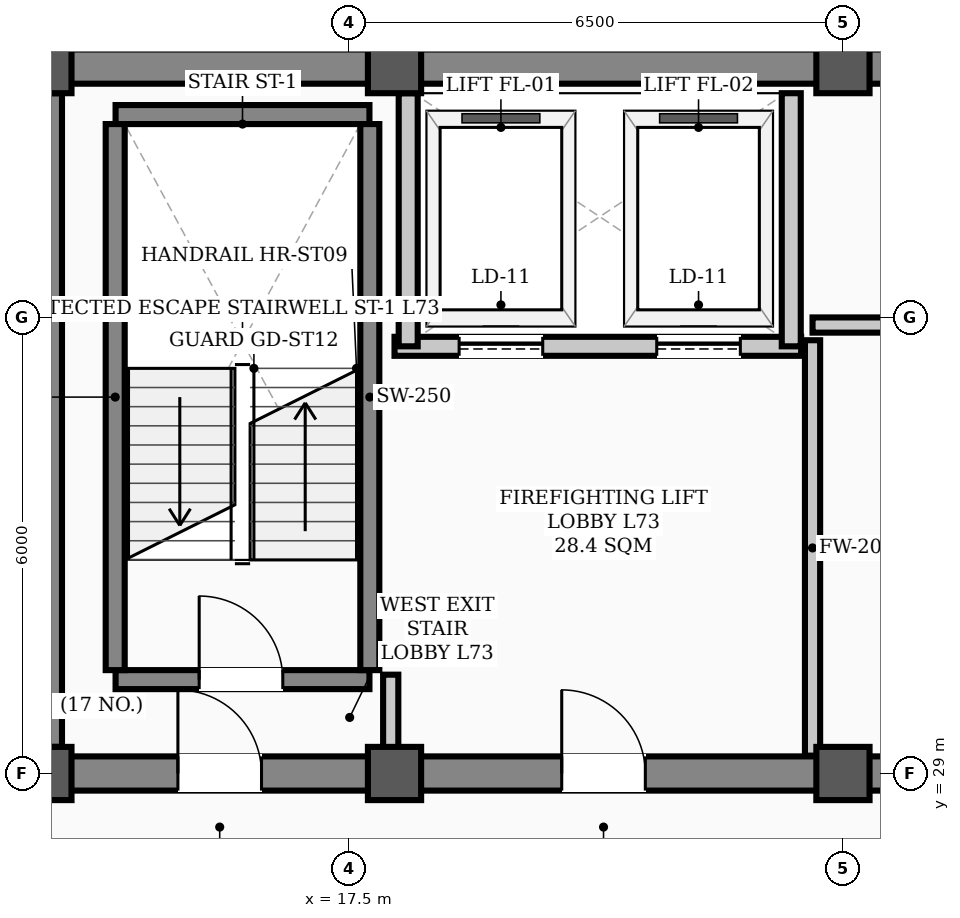
"""IFC4 building model, lengths in metres.
Left out: names, types, materials, properties, quantities, classifications, styles, units other than length and angle.
Written with IfcOpenShell. Run it as: python <this file> out.ifc"""

import sys

from ifc_helpers import new_model, si_unit, direction, frame, frame_2d, origin, origin_2d, place, context, subcontext, project, spatial, rectangle, hollow_rectangle, extrude, element, fill, save


model = new_model("IFC4")
c1 = context("Model", 3, precision=1e-05, world=origin(), true_north=direction((0.0, 1.0)))
c2 = subcontext(c1, "Body", "Model", "MODEL_VIEW")
j1 = project(units=[si_unit("LENGTHUNIT", "METRE"), si_unit("PLANEANGLEUNIT", "RADIAN")], contexts=[c1])
p1 = place(None, origin())
s1 = spatial("IfcSite", under=j1, at=p1, CompositionType="ELEMENT")
p2 = place(p1, origin())
s2 = spatial("IfcBuilding", under=s1, at=p2, CompositionType="ELEMENT")
p3 = place(p2, frame((0.0, 0.0, 293.0)))
s3 = spatial("IfcBuildingStorey", under=s2, at=p3, CompositionType="ELEMENT", Elevation=293.0)
for number, where, z_axis, x_axis in (
    (1, (13.5, 29.0, 0.0), (0.0, 0.0, 1.0), (1.0, 0.0, 0.0)),
    (2, (13.5, 38.3, 0.0), (0.0, 0.0, 1.0), (1.0, 0.0, 0.0)),
    (3, (18.1, 29.0, 0.0), (0.0, 0.0, 1.0), (1.0, 0.0, 0.0)),
    (4, (18.1, 38.3, 0.0), (0.0, 0.0, 1.0), (1.0, 0.0, 0.0)),
    (5, (24.0, 29.0, 0.0), (0.0, 0.0, 1.0), (1.0, 0.0, 0.0)),
    (6, (24.0, 38.3, 0.0), (0.0, 0.0, 1.0), (1.0, 0.0, 0.0)),
):
    element("IfcColumn", number, at=place(p3, frame(where, z_axis=z_axis, x_axis=x_axis)), inside=s3, PredefinedType="COLUMN", context=c2, shape_type="SweptSolid", body=[
        extrude(hollow_rectangle(XDim=0.7, YDim=0.7, WallThickness=0.028, InnerFilletRadius=0.014, OuterFilletRadius=0.042, at=origin_2d()), origin(), (0.0, 0.0, 1.0), 3.9),
    ])
p4 = place(p3, frame((13.5, 29.0, 0.0), z_axis=(0.0, 0.0, 1.0), x_axis=(1.0, 0.0, 0.0)))
e7 = element("IfcWall", 7, at=p4, inside=s3, PredefinedType="SHEAR", context=c2, shape_type="SweptSolid", body=[
    extrude(rectangle(XDim=30.5, YDim=0.45, at=frame_2d((15.25, 0.0))), origin(), (0.0, 0.0, 1.0), 3.72),
])
p5 = place(p4, frame((1.75, 0.0, 0.0)))
e8 = element("IfcOpeningElement", 8, at=p5, cuts=e7, PredefinedType="OPENING", context=c2, shape_type="SweptSolid", body=[
    extrude(rectangle(XDim=1.1, YDim=2.08, at=frame_2d((0.55, 1.04))), frame((0.0, 0.235, 0.0), z_axis=(0.0, -1.0, 0.0), x_axis=(1.0, 0.0, 0.0)), (0.0, 0.0, 1.0), 0.47),
])
p6 = place(p4, frame((26.7, 0.0, 0.0)))
e9 = element("IfcOpeningElement", 9, at=p6, cuts=e7, PredefinedType="OPENING", context=c2, shape_type="SweptSolid", body=[
    extrude(rectangle(XDim=1.1, YDim=2.08, at=frame_2d((0.55, 1.04))), frame((0.0, 0.235, 0.0), z_axis=(0.0, -1.0, 0.0), x_axis=(1.0, 0.0, 0.0)), (0.0, 0.0, 1.0), 0.47),
])
p7 = place(p4, frame((6.8, 0.0, 0.0)))
e10 = element("IfcOpeningElement", 10, at=p7, cuts=e7, PredefinedType="OPENING", context=c2, shape_type="SweptSolid", body=[
    extrude(rectangle(XDim=1.1, YDim=2.08, at=frame_2d((0.55, 1.04))), frame((0.0, 0.235, 0.0), z_axis=(0.0, -1.0, 0.0), x_axis=(1.0, 0.0, 0.0)), (0.0, 0.0, 1.0), 0.47),
])
p8 = place(p4, frame((13.2, 0.0, 0.0)))
e11 = element("IfcOpeningElement", 11, at=p8, cuts=e7, PredefinedType="OPENING", context=c2, shape_type="SweptSolid", body=[
    extrude(rectangle(XDim=1.6, YDim=2.08, at=frame_2d((0.8, 1.04))), frame((0.0, 0.235, 0.0), z_axis=(0.0, -1.0, 0.0), x_axis=(1.0, 0.0, 0.0)), (0.0, 0.0, 1.0), 0.47),
])
p9 = place(p4, frame((19.5, 0.0, 0.0)))
e12 = element("IfcOpeningElement", 12, at=p9, cuts=e7, PredefinedType="OPENING", context=c2, shape_type="SweptSolid", body=[
    extrude(rectangle(XDim=0.9, YDim=2.08, at=frame_2d((0.45, 1.04))), frame((0.0, 0.235, 0.0), z_axis=(0.0, -1.0, 0.0), x_axis=(1.0, 0.0, 0.0)), (0.0, 0.0, 1.0), 0.47),
])
p10 = place(p4, frame((21.55, 0.0, 0.0)))
e13 = element("IfcOpeningElement", 13, at=p10, cuts=e7, PredefinedType="OPENING", context=c2, shape_type="SweptSolid", body=[
    extrude(rectangle(XDim=0.9, YDim=2.08, at=frame_2d((0.45, 1.04))), frame((0.0, 0.235, 0.0), z_axis=(0.0, -1.0, 0.0), x_axis=(1.0, 0.0, 0.0)), (0.0, 0.0, 1.0), 0.47),
])
p11 = place(p3, frame((13.5, 38.3, 0.0), z_axis=(0.0, 0.0, 1.0), x_axis=(1.0, 0.0, 0.0)))
e14 = element("IfcWall", 14, at=p11, inside=s3, PredefinedType="SHEAR", context=c2, shape_type="SweptSolid", body=[
    extrude(rectangle(XDim=30.5, YDim=0.45, at=frame_2d((15.25, 0.0))), origin(), (0.0, 0.0, 1.0), 3.72),
])
p12 = place(p3, frame((13.5, 29.35, 0.0), z_axis=(0.0, 0.0, 1.0), x_axis=(0.0, 1.0, 0.0)))
e15 = element("IfcWall", 15, at=p12, inside=s3, PredefinedType="SHEAR", context=c2, shape_type="SweptSolid", body=[
    extrude(rectangle(XDim=8.6, YDim=0.45, at=frame_2d((4.3, 0.0))), origin(), (0.0, 0.0, 1.0), 3.72),
])
p13 = place(p3, frame((14.43, 30.235, 0.0), z_axis=(0.0, 0.0, 1.0), x_axis=(1.0, 0.0, 0.0)))
e16 = element("IfcWall", 16, at=p13, inside=s3, PredefinedType="STANDARD", context=c2, shape_type="SweptSolid", body=[
    extrude(rectangle(XDim=3.34, YDim=0.25, at=frame_2d((1.67, 0.0))), origin(), (0.0, 0.0, 1.0), 3.72),
])
p14 = place(p13, frame((1.1, 0.0, 0.0)))
e17 = element("IfcOpeningElement", 17, at=p14, cuts=e16, PredefinedType="OPENING", context=c2, shape_type="SweptSolid", body=[
    extrude(rectangle(XDim=1.1, YDim=2.08, at=frame_2d((0.55, 1.04))), frame((0.0, 0.135, 0.0), z_axis=(0.0, -1.0, 0.0), x_axis=(1.0, 0.0, 0.0)), (0.0, 0.0, 1.0), 0.27),
])
p15 = place(p3, frame((14.43, 37.669, 0.0), z_axis=(0.0, 0.0, 1.0), x_axis=(1.0, 0.0, 0.0)))
e18 = element("IfcWall", 18, at=p15, inside=s3, PredefinedType="STANDARD", context=c2, shape_type="SweptSolid", body=[
    extrude(rectangle(XDim=3.34, YDim=0.25, at=frame_2d((1.67, 0.0))), origin(), (0.0, 0.0, 1.0), 3.72),
])
for number, where, z_axis, x_axis in (
    (19, (14.425, 30.36, 0.0), (0.0, 0.0, 1.0), (0.0, 1.0, 0.0)),
    (20, (17.775, 30.36, 0.0), (0.0, 0.0, 1.0), (0.0, 1.0, 0.0)),
):
    element("IfcWall", number, at=place(p3, frame(where, z_axis=z_axis, x_axis=x_axis)), inside=s3, PredefinedType="STANDARD", context=c2, shape_type="SweptSolid", body=[
        extrude(rectangle(XDim=7.184, YDim=0.25, at=frame_2d((3.592, 0.0))), origin(), (0.0, 0.0, 1.0), 3.72),
    ])
p16 = place(p3, frame((18.1, 34.62, 0.0), z_axis=(0.0, 0.0, 1.0), x_axis=(1.0, 0.0, 0.0)))
e21 = element("IfcWall", 21, at=p16, inside=s3, PredefinedType="STANDARD", context=c2, shape_type="SweptSolid", body=[
    extrude(rectangle(XDim=5.35, YDim=0.25, at=frame_2d((2.675, 0.0))), origin(), (0.0, 0.0, 1.0), 3.72),
])
p17 = place(p16, frame((0.85, 0.0, 0.0)))
e22 = element("IfcOpeningElement", 22, at=p17, cuts=e21, PredefinedType="OPENING", context=c2, shape_type="SweptSolid", body=[
    extrude(rectangle(XDim=1.1, YDim=2.08, at=frame_2d((0.55, 1.04))), frame((0.0, 0.135, 0.0), z_axis=(0.0, -1.0, 0.0), x_axis=(1.0, 0.0, 0.0)), (0.0, 0.0, 1.0), 0.27),
])
p18 = place(p16, frame((3.45, 0.0, 0.0)))
e23 = element("IfcOpeningElement", 23, at=p18, cuts=e21, PredefinedType="OPENING", context=c2, shape_type="SweptSolid", body=[
    extrude(rectangle(XDim=1.1, YDim=2.08, at=frame_2d((0.55, 1.04))), frame((0.0, 0.135, 0.0), z_axis=(0.0, -1.0, 0.0), x_axis=(1.0, 0.0, 0.0)), (0.0, 0.0, 1.0), 0.27),
])
for number, where, z_axis, x_axis in (
    (24, (18.28, 34.62, 0.0), (0.0, 0.0, 1.0), (0.0, 1.0, 0.0)),
    (25, (23.32, 34.62, 0.0), (0.0, 0.0, 1.0), (0.0, 1.0, 0.0)),
):
    element("IfcWall", number, at=place(p3, frame(where, z_axis=z_axis, x_axis=x_axis)), inside=s3, PredefinedType="STANDARD", context=c2, shape_type="SweptSolid", body=[
        extrude(rectangle(XDim=3.33, YDim=0.25, at=frame_2d((1.665, 0.0))), origin(), (0.0, 0.0, 1.0), 3.72),
    ])
p19 = place(p3, frame((23.6, 34.9, 0.0), z_axis=(0.0, 0.0, 1.0), x_axis=(1.0, 0.0, 0.0)))
e26 = element("IfcWall", 26, at=p19, inside=s3, PredefinedType="STANDARD", context=c2, shape_type="SweptSolid", body=[
    extrude(rectangle(XDim=8.18, YDim=0.2, at=frame_2d((4.09, 0.0))), origin(), (0.0, 0.0, 1.0), 3.72),
])
p20 = place(p19, frame((3.45, 0.0, 0.0)))
e27 = element("IfcOpeningElement", 27, at=p20, cuts=e26, PredefinedType="OPENING", context=c2, shape_type="SweptSolid", body=[
    extrude(rectangle(XDim=1.1, YDim=2.08, at=frame_2d((0.55, 1.04))), frame((0.0, 0.11, 0.0), z_axis=(0.0, -1.0, 0.0), x_axis=(1.0, 0.0, 0.0)), (0.0, 0.0, 1.0), 0.22),
])
p21 = place(p3, frame((18.05, 29.235, 0.0), z_axis=(0.0, 0.0, 1.0), x_axis=(0.0, 1.0, 0.0)))
e28 = element("IfcWall", 28, at=p21, inside=s3, PredefinedType="STANDARD", context=c2, shape_type="SweptSolid", body=[
    extrude(rectangle(XDim=1.065, YDim=0.2, at=frame_2d((0.532, 0.0))), origin(), (0.0, 0.0, 1.0), 3.72),
])
p22 = place(p3, frame((23.6, 29.235, 0.0), z_axis=(0.0, 0.0, 1.0), x_axis=(0.0, 1.0, 0.0)))
e29 = element("IfcWall", 29, at=p22, inside=s3, PredefinedType="STANDARD", context=c2, shape_type="SweptSolid", body=[
    extrude(rectangle(XDim=5.465, YDim=0.2, at=frame_2d((2.732, 0.0))), origin(), (0.0, 0.0, 1.0), 3.2),
])
p23 = place(p14, origin())
e30 = element("IfcDoor", 30, at=p23, inside=s3, OperationType="SINGLE_SWING_LEFT", PredefinedType="DOOR", context=c2, shape_type="SweptSolid", body=[
    extrude(rectangle(XDim=1.1, YDim=2.08, at=frame_2d((0.55, 1.04))), frame((0.0, 0.025, 0.0), z_axis=(0.0, -1.0, 0.0), x_axis=(1.0, 0.0, 0.0)), (0.0, 0.0, 1.0), 0.05),
])
fill(e17, e30)
p24 = place(p5, origin())
e31 = element("IfcDoor", 31, at=p24, inside=s3, OperationType="SINGLE_SWING_LEFT", PredefinedType="DOOR", context=c2, shape_type="SweptSolid", body=[
    extrude(rectangle(XDim=1.1, YDim=2.08, at=frame_2d((0.55, 1.04))), frame((0.0, 0.025, 0.0), z_axis=(0.0, -1.0, 0.0), x_axis=(1.0, 0.0, 0.0)), (0.0, 0.0, 1.0), 0.05),
])
fill(e8, e31)
p25 = place(p7, origin())
e32 = element("IfcDoor", 32, at=p25, inside=s3, OperationType="SINGLE_SWING_LEFT", PredefinedType="DOOR", context=c2, shape_type="SweptSolid", body=[
    extrude(rectangle(XDim=1.1, YDim=2.08, at=frame_2d((0.55, 1.04))), frame((0.0, 0.025, 0.0), z_axis=(0.0, -1.0, 0.0), x_axis=(1.0, 0.0, 0.0)), (0.0, 0.0, 1.0), 0.05),
])
fill(e10, e32)
p26 = place(p17, origin())
e33 = element("IfcDoor", 33, at=p26, inside=s3, OperationType="SLIDING_TO_LEFT", PredefinedType="DOOR", context=c2, shape_type="SweptSolid", body=[
    extrude(rectangle(XDim=1.1, YDim=2.08, at=frame_2d((0.55, 1.04))), frame((0.0, 0.025, 0.0), z_axis=(0.0, -1.0, 0.0), x_axis=(1.0, 0.0, 0.0)), (0.0, 0.0, 1.0), 0.05),
])
fill(e22, e33)
p27 = place(p18, origin())
e34 = element("IfcDoor", 34, at=p27, inside=s3, OperationType="SLIDING_TO_LEFT", PredefinedType="DOOR", context=c2, shape_type="SweptSolid", body=[
    extrude(rectangle(XDim=1.1, YDim=2.08, at=frame_2d((0.55, 1.04))), frame((0.0, 0.025, 0.0), z_axis=(0.0, -1.0, 0.0), x_axis=(1.0, 0.0, 0.0)), (0.0, 0.0, 1.0), 0.05),
])
fill(e23, e34)
save(model, sys.argv[1])
